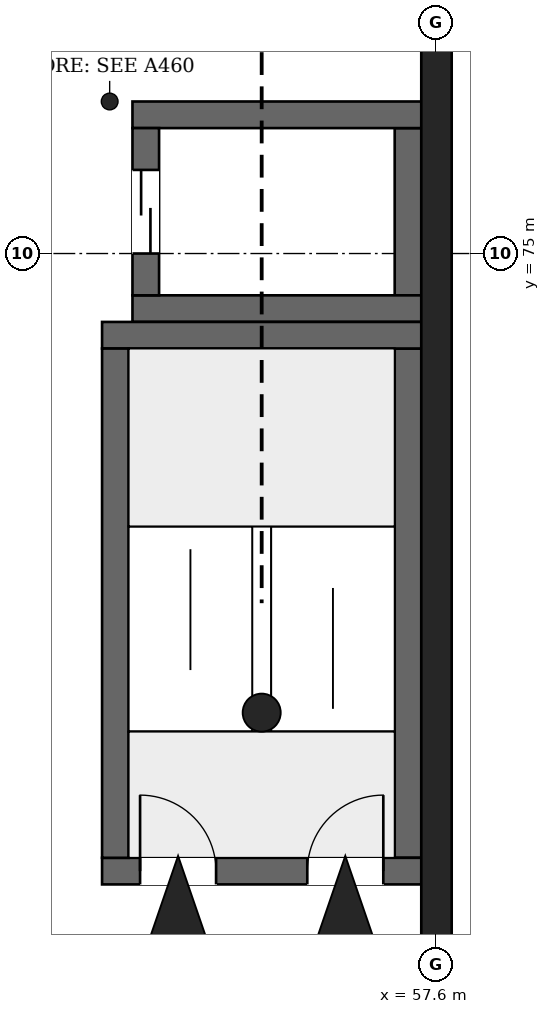
"""IFC4 building model, lengths in metres.
Left out: names, types, materials, properties, quantities, classifications, styles, units other than length and angle.
Written with IfcOpenShell. Run it as: python <this file> out.ifc"""

import sys

from ifc_helpers import new_model, si_unit, direction, frame, frame_2d, origin, place, context, subcontext, project, spatial, rectangle, extrude, element, fill, save


model = new_model("IFC4")
c1 = context("Model", 3, precision=1e-05, world=origin(), true_north=direction((0.0, 1.0)))
c2 = subcontext(c1, "Body", "Model", "MODEL_VIEW")
j1 = project(units=[si_unit("LENGTHUNIT", "METRE"), si_unit("PLANEANGLEUNIT", "RADIAN")], contexts=[c1])
p1 = place(None, origin())
s1 = spatial("IfcSite", under=j1, at=p1, CompositionType="ELEMENT")
p2 = place(p1, origin())
s2 = spatial("IfcBuilding", under=s1, at=p2, CompositionType="ELEMENT")
p3 = place(p2, frame((0.0, 0.0, 26.7)))
s3 = spatial("IfcBuildingStorey", under=s2, at=p3, CompositionType="ELEMENT", Elevation=26.7)
p4 = place(p3, frame((57.6, 46.72, 0.0), z_axis=(0.0, 0.0, 1.0), x_axis=(0.0, 1.0, 0.0)))
e1 = element("IfcWall", 1, at=p4, inside=s3, PredefinedType="SHEAR", context=c2, shape_type="SweptSolid", body=[
    extrude(rectangle(XDim=47.36, YDim=0.4, at=frame_2d((23.68, 0.0))), origin(), (0.0, 0.0, 1.0), 5.2),
])
p5 = place(p3, frame((53.2, 66.875, 0.0), z_axis=(0.0, 0.0, 1.0), x_axis=(1.0, 0.0, 0.0)))
e2 = element("IfcWall", 2, at=p5, inside=s3, PredefinedType="SHEAR", context=c2, shape_type="SweptSolid", body=[
    extrude(rectangle(XDim=4.2, YDim=0.35, at=frame_2d((2.1, 0.0))), origin(), (0.0, 0.0, 1.0), 5.2),
])
p6 = place(p5, frame((0.5, 0.0, 0.0)))
e3 = element("IfcOpeningElement", 3, at=p6, cuts=e2, PredefinedType="OPENING", context=c2, shape_type="SweptSolid", body=[
    extrude(rectangle(XDim=1.0, YDim=2.1, at=frame_2d((0.5, 1.05))), frame((0.0, 0.185, 0.0), z_axis=(0.0, -1.0, 0.0), x_axis=(1.0, 0.0, 0.0)), (0.0, 0.0, 1.0), 0.37),
])
p7 = place(p5, frame((2.7, 0.0, 0.0)))
e4 = element("IfcOpeningElement", 4, at=p7, cuts=e2, PredefinedType="OPENING", context=c2, shape_type="SweptSolid", body=[
    extrude(rectangle(XDim=1.0, YDim=2.1, at=frame_2d((0.5, 1.05))), frame((0.0, 0.185, 0.0), z_axis=(0.0, -1.0, 0.0), x_axis=(1.0, 0.0, 0.0)), (0.0, 0.0, 1.0), 0.37),
])
p8 = place(p3, frame((53.2, 73.925, 0.0), z_axis=(0.0, 0.0, 1.0), x_axis=(1.0, 0.0, 0.0)))
e5 = element("IfcWall", 5, at=p8, inside=s3, PredefinedType="SHEAR", context=c2, shape_type="SweptSolid", body=[
    extrude(rectangle(XDim=4.2, YDim=0.35, at=frame_2d((2.1, 0.0))), origin(), (0.0, 0.0, 1.0), 5.2),
])
for number, where, z_axis, x_axis in (
    (6, (53.375, 67.05, 0.0), (0.0, 0.0, 1.0), (0.0, 1.0, 0.0)),
    (7, (57.225, 67.05, 0.0), (0.0, 0.0, 1.0), (0.0, 1.0, 0.0)),
):
    element("IfcWall", number, at=place(p3, frame(where, z_axis=z_axis, x_axis=x_axis)), inside=s3, PredefinedType="SHEAR", context=c2, shape_type="SweptSolid", body=[
        extrude(rectangle(XDim=6.7, YDim=0.35, at=frame_2d((3.35, 0.0))), origin(), (0.0, 0.0, 1.0), 5.2),
    ])
for number, where, z_axis, x_axis in (
    (8, (53.6, 74.275, 0.0), (0.0, 0.0, 1.0), (1.0, 0.0, 0.0)),
    (9, (53.6, 76.825, 0.0), (0.0, 0.0, 1.0), (1.0, 0.0, 0.0)),
):
    element("IfcWall", number, at=place(p3, frame(where, z_axis=z_axis, x_axis=x_axis)), inside=s3, PredefinedType="SHEAR", context=c2, shape_type="SweptSolid", body=[
        extrude(rectangle(XDim=3.8, YDim=0.35, at=frame_2d((1.9, 0.0))), origin(), (0.0, 0.0, 1.0), 5.2),
    ])
p9 = place(p3, frame((53.775, 74.45, 0.0), z_axis=(0.0, 0.0, 1.0), x_axis=(0.0, 1.0, 0.0)))
e10 = element("IfcWall", 10, at=p9, inside=s3, PredefinedType="SHEAR", context=c2, shape_type="SweptSolid", body=[
    extrude(rectangle(XDim=2.2, YDim=0.35, at=frame_2d((1.1, 0.0))), origin(), (0.0, 0.0, 1.0), 5.2),
])
p10 = place(p9, frame((0.55, 0.0, 0.0)))
e11 = element("IfcOpeningElement", 11, at=p10, cuts=e10, PredefinedType="OPENING", context=c2, shape_type="SweptSolid", body=[
    extrude(rectangle(XDim=1.1, YDim=2.1, at=frame_2d((0.55, 1.05))), frame((0.0, 0.185, 0.0), z_axis=(0.0, -1.0, 0.0), x_axis=(1.0, 0.0, 0.0)), (0.0, 0.0, 1.0), 0.37),
])
p11 = place(p3, frame((57.225, 74.45, 0.0), z_axis=(0.0, 0.0, 1.0), x_axis=(0.0, 1.0, 0.0)))
e12 = element("IfcWall", 12, at=p11, inside=s3, PredefinedType="SHEAR", context=c2, shape_type="SweptSolid", body=[
    extrude(rectangle(XDim=2.2, YDim=0.35, at=frame_2d((1.1, 0.0))), origin(), (0.0, 0.0, 1.0), 5.2),
])
p12 = place(p6, origin())
e13 = element("IfcDoor", 13, at=p12, inside=s3, OperationType="SINGLE_SWING_RIGHT", PredefinedType="DOOR", context=c2, shape_type="SweptSolid", body=[
    extrude(rectangle(XDim=1.0, YDim=2.1, at=frame_2d((0.5, 1.05))), frame((0.0, 0.025, 0.0), z_axis=(0.0, -1.0, 0.0), x_axis=(1.0, 0.0, 0.0)), (0.0, 0.0, 1.0), 0.05),
])
fill(e3, e13)
p13 = place(p7, origin())
e14 = element("IfcDoor", 14, at=p13, inside=s3, OperationType="SINGLE_SWING_LEFT", PredefinedType="DOOR", context=c2, shape_type="SweptSolid", body=[
    extrude(rectangle(XDim=1.0, YDim=2.1, at=frame_2d((0.5, 1.05))), frame((0.0, 0.025, 0.0), z_axis=(0.0, -1.0, 0.0), x_axis=(1.0, 0.0, 0.0)), (0.0, 0.0, 1.0), 0.05),
])
fill(e4, e14)
p14 = place(p10, origin())
e15 = element("IfcDoor", 15, at=p14, inside=s3, OperationType="DOUBLE_DOOR_SLIDING", PredefinedType="DOOR", context=c2, shape_type="SweptSolid", body=[
    extrude(rectangle(XDim=1.1, YDim=2.1, at=frame_2d((0.55, 1.05))), frame((0.0, 0.025, 0.0), z_axis=(0.0, -1.0, 0.0), x_axis=(1.0, 0.0, 0.0)), (0.0, 0.0, 1.0), 0.05),
])
fill(e11, e15)
save(model, sys.argv[1])
